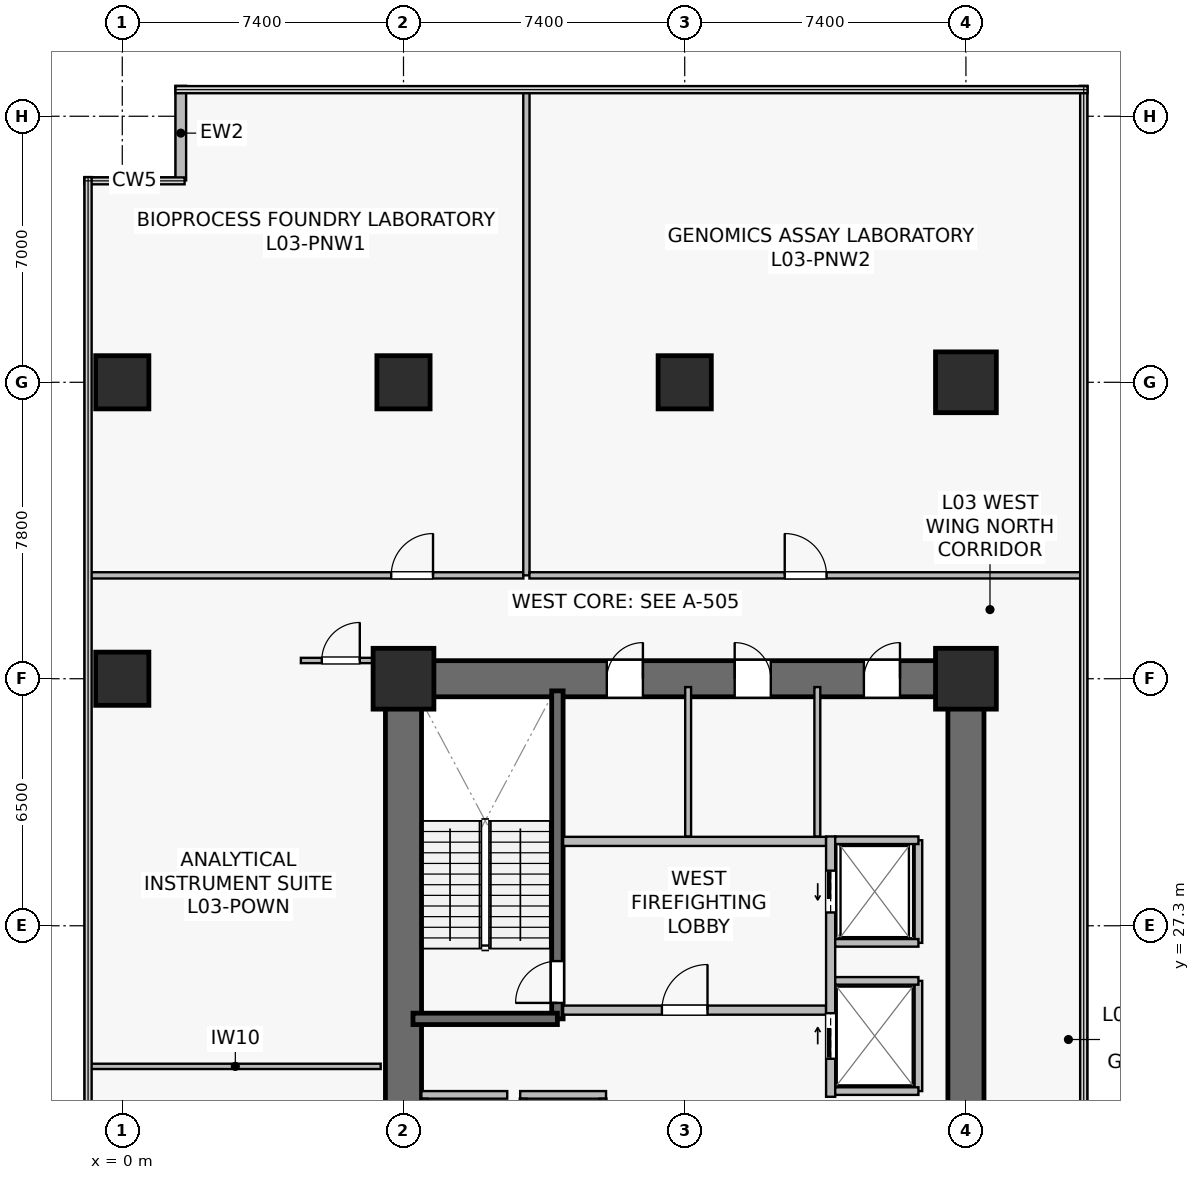
"""IFC4 building model, lengths in metres.
Left out: names, types, materials, properties, quantities, classifications, styles, units other than length and angle.
Written with IfcOpenShell. Run it as: python <this file> out.ifc"""

import sys

from ifc_helpers import new_model, si_unit, direction, frame, frame_2d, origin, origin_2d, place, context, subcontext, project, spatial, rectangle, extrude, source, transform, mapped, element, fill, save


model = new_model("IFC4")
c1 = context("Model", 3, precision=1e-05, world=origin(), true_north=direction((0.0, 1.0)))
c2 = subcontext(c1, "Body", "Model", "MODEL_VIEW")
j1 = project(units=[si_unit("LENGTHUNIT", "METRE"), si_unit("PLANEANGLEUNIT", "RADIAN")], contexts=[c1])
p1 = place(None, origin())
s1 = spatial("IfcSite", under=j1, at=p1, CompositionType="ELEMENT")
p2 = place(p1, origin())
s2 = spatial("IfcBuilding", under=s1, at=p2, CompositionType="ELEMENT")
p3 = place(p2, frame((0.0, 0.0, 10.2)))
s3 = spatial("IfcBuildingStorey", under=s2, at=p3, CompositionType="ELEMENT", Elevation=10.2)
p4 = place(p3, frame((6.925, 33.8, 0.0), z_axis=(0.0, 0.0, 1.0), x_axis=(1.0, 0.0, 0.0)))
e1 = element("IfcWall", 1, at=p4, inside=s3, PredefinedType="SHEAR", context=c2, shape_type="SweptSolid", body=[
    extrude(rectangle(XDim=15.75, YDim=0.95, at=frame_2d((7.875, 0.0))), origin(), (0.0, 0.0, 1.0), 4.45),
])
p5 = place(p4, frame((5.825, 0.0, 0.0)))
e2 = element("IfcOpeningElement", 2, at=p5, cuts=e1, PredefinedType="OPENING", context=c2, shape_type="SweptSolid", body=[
    extrude(rectangle(XDim=0.95, YDim=2.15, at=frame_2d((0.475, 1.075))), frame((0.0, 0.485, 0.0), z_axis=(0.0, -1.0, 0.0), x_axis=(1.0, 0.0, 0.0)), (0.0, 0.0, 1.0), 0.97),
])
p6 = place(p4, frame((9.19, 0.0, 0.0)))
e3 = element("IfcOpeningElement", 3, at=p6, cuts=e1, PredefinedType="OPENING", context=c2, shape_type="SweptSolid", body=[
    extrude(rectangle(XDim=0.95, YDim=2.15, at=frame_2d((0.475, 1.075))), frame((0.0, 0.485, 0.0), z_axis=(0.0, -1.0, 0.0), x_axis=(1.0, 0.0, 0.0)), (0.0, 0.0, 1.0), 0.97),
])
p7 = place(p4, frame((12.59, 0.0, 0.0)))
e4 = element("IfcOpeningElement", 4, at=p7, cuts=e1, PredefinedType="OPENING", context=c2, shape_type="SweptSolid", body=[
    extrude(rectangle(XDim=0.95, YDim=2.15, at=frame_2d((0.475, 1.075))), frame((0.0, 0.485, 0.0), z_axis=(0.0, -1.0, 0.0), x_axis=(1.0, 0.0, 0.0)), (0.0, 0.0, 1.0), 0.97),
])
p8 = place(p3, frame((7.4, 15.275, 0.0), z_axis=(0.0, 0.0, 1.0), x_axis=(0.0, 1.0, 0.0)))
e5 = element("IfcWall", 5, at=p8, inside=s3, PredefinedType="SHEAR", context=c2, shape_type="SweptSolid", body=[
    extrude(rectangle(XDim=18.05, YDim=0.95, at=frame_2d((9.025, 0.0))), origin(), (0.0, 0.0, 1.0), 4.45),
])
p9 = place(p3, frame((22.2, 15.275, 0.0), z_axis=(0.0, 0.0, 1.0), x_axis=(0.0, 1.0, 0.0)))
e6 = element("IfcWall", 6, at=p9, inside=s3, PredefinedType="SHEAR", context=c2, shape_type="SweptSolid", body=[
    extrude(rectangle(XDim=18.05, YDim=0.95, at=frame_2d((9.025, 0.0))), origin(), (0.0, 0.0, 1.0), 4.45),
])
p10 = place(p9, frame((3.275, 0.0, 0.0)))
e7 = element("IfcOpeningElement", 7, at=p10, cuts=e6, PredefinedType="OPENING", context=c2, shape_type="SweptSolid", body=[
    extrude(rectangle(XDim=1.42, YDim=2.2, at=frame_2d((0.71, 1.1))), frame((0.0, 0.485, 0.0), z_axis=(0.0, -1.0, 0.0), x_axis=(1.0, 0.0, 0.0)), (0.0, 0.0, 1.0), 0.97),
])
p11 = place(p3, frame((11.45, 24.85, 0.0), z_axis=(0.0, 0.0, 1.0), x_axis=(0.0, 1.0, 0.0)))
e8 = element("IfcWall", 8, at=p11, inside=s3, PredefinedType="SHEAR", context=c2, shape_type="SweptSolid", body=[
    extrude(rectangle(XDim=8.63, YDim=0.3, at=frame_2d((4.315, 0.0))), origin(), (0.0, 0.0, 1.0), 4.45),
])
p12 = place(p11, frame((0.42, 0.0, 0.0)))
e9 = element("IfcOpeningElement", 9, at=p12, cuts=e8, PredefinedType="OPENING", context=c2, shape_type="SweptSolid", body=[
    extrude(rectangle(XDim=1.1, YDim=2.15, at=frame_2d((0.55, 1.075))), frame((0.0, 0.16, 0.0), z_axis=(0.0, -1.0, 0.0), x_axis=(1.0, 0.0, 0.0)), (0.0, 0.0, 1.0), 0.32),
])
p13 = place(p3, frame((7.65, 24.85, 0.0), z_axis=(0.0, 0.0, 1.0), x_axis=(1.0, 0.0, 0.0)))
e10 = element("IfcWall", 10, at=p13, inside=s3, PredefinedType="SHEAR", context=c2, shape_type="SweptSolid", body=[
    extrude(rectangle(XDim=3.8, YDim=0.3, at=frame_2d((1.9, 0.0))), origin(), (0.0, 0.0, 1.0), 4.45),
])
m1 = source(origin(), c2, "Body", "SweptSolid", [
    extrude(rectangle(XDim=1.6, YDim=1.6, at=origin_2d()), origin(), (0.0, 0.0, 1.0), 4.8),
])
for number, where, z_axis, x_axis in (
    (11, (7.4, 33.8, 0.0), (0.0, 0.0, 1.0), (1.0, 0.0, 0.0)),
    (12, (22.2, 33.8, 0.0), (0.0, 0.0, 1.0), (1.0, 0.0, 0.0)),
):
    element("IfcColumn", number, at=place(p3, frame(where, z_axis=z_axis, x_axis=x_axis)), inside=s3, PredefinedType="COLUMN", context=c2, shape_type="MappedRepresentation", body=[
        mapped(m1, transform((0.0, 0.0, 0.0), scale=1.0)),
    ])
m2 = source(origin(), c2, "Body", "SweptSolid", [
    extrude(rectangle(XDim=1.4, YDim=1.4, at=origin_2d()), origin(), (0.0, 0.0, 1.0), 4.8),
])
p14 = place(p3, frame((14.8, 41.6, 0.0), z_axis=(0.0, 0.0, 1.0), x_axis=(1.0, 0.0, 0.0)))
e13 = element("IfcColumn", 13, at=p14, inside=s3, PredefinedType="COLUMN", context=c2, shape_type="MappedRepresentation", body=[
    mapped(m2, transform((0.0, 0.0, 0.0), scale=1.0)),
])
p15 = place(p3, frame((22.2, 41.6, 0.0), z_axis=(0.0, 0.0, 1.0), x_axis=(1.0, 0.0, 0.0)))
e14 = element("IfcColumn", 14, at=p15, inside=s3, PredefinedType="COLUMN", context=c2, shape_type="MappedRepresentation", body=[
    mapped(m1, transform((0.0, 0.0, 0.0), scale=1.0)),
])
for number, where, z_axis, x_axis in (
    (15, (7.4, 41.6, 0.0), (0.0, 0.0, 1.0), (1.0, 0.0, 0.0)),
    (16, (0.0, 33.8, 0.0), (0.0, 0.0, 1.0), (1.0, 0.0, 0.0)),
    (17, (0.0, 41.6, 0.0), (0.0, 0.0, 1.0), (1.0, 0.0, 0.0)),
):
    element("IfcColumn", number, at=place(p3, frame(where, z_axis=z_axis, x_axis=x_axis)), inside=s3, PredefinedType="COLUMN", context=c2, shape_type="MappedRepresentation", body=[
        mapped(m2, transform((0.0, 0.0, 0.0), scale=1.0)),
    ])
p16 = place(p3, frame((1.54, 49.4, 0.0), z_axis=(0.0, 0.0, 1.0), x_axis=(0.0, -1.0, 0.0)))
e18 = element("IfcWall", 18, at=p16, inside=s3, PredefinedType="STANDARD", context=c2, shape_type="SweptSolid", body=[
    extrude(rectangle(XDim=2.488, YDim=0.28, at=frame_2d((1.244, 0.0))), origin(), (0.0, 0.0, 1.0), 4.45),
])
p17 = place(p3, frame((11.6, 25.08, 0.0), z_axis=(0.0, 0.0, 1.0), x_axis=(1.0, 0.0, 0.0)))
e19 = element("IfcWall", 19, at=p17, inside=s3, PredefinedType="SOLIDWALL", context=c2, shape_type="SweptSolid", body=[
    extrude(rectangle(XDim=6.92, YDim=0.24, at=frame_2d((3.46, 0.0))), origin(), (0.0, 0.0, 1.0), 3.735),
])
p18 = place(p17, frame((2.6, 0.0, 0.0)))
e20 = element("IfcOpeningElement", 20, at=p18, cuts=e19, PredefinedType="OPENING", context=c2, shape_type="SweptSolid", body=[
    extrude(rectangle(XDim=1.2, YDim=2.16, at=frame_2d((0.6, 1.08))), frame((0.0, 0.13, 0.0), z_axis=(0.0, -1.0, 0.0), x_axis=(1.0, 0.0, 0.0)), (0.0, 0.0, 1.0), 0.26),
])
p19 = place(p3, frame((11.6, 29.52, 0.0), z_axis=(0.0, 0.0, 1.0), x_axis=(1.0, 0.0, 0.0)))
e21 = element("IfcWall", 21, at=p19, inside=s3, PredefinedType="SOLIDWALL", context=c2, shape_type="SweptSolid", body=[
    extrude(rectangle(XDim=6.92, YDim=0.24, at=frame_2d((3.46, 0.0))), origin(), (0.0, 0.0, 1.0), 3.735),
])
p20 = place(p3, frame((18.64, 22.8, 0.0), z_axis=(0.0, 0.0, 1.0), x_axis=(0.0, 1.0, 0.0)))
e22 = element("IfcWall", 22, at=p20, inside=s3, PredefinedType="SOLIDWALL", context=c2, shape_type="SweptSolid", body=[
    extrude(rectangle(XDim=6.85, YDim=0.24, at=frame_2d((3.425, 0.0))), origin(), (0.0, 0.0, 1.0), 3.535),
])
p21 = place(p20, frame((4.85, 0.0, 0.0)))
e23 = element("IfcOpeningElement", 23, at=p21, cuts=e22, PredefinedType="OPENING", context=c2, shape_type="SweptSolid", body=[
    extrude(rectangle(XDim=1.1, YDim=2.22, at=frame_2d((0.55, 1.11))), frame((0.0, 0.13, 0.0), z_axis=(0.0, -1.0, 0.0), x_axis=(1.0, 0.0, 0.0)), (0.0, 0.0, 1.0), 0.26),
])
p22 = place(p20, frame((1.0, 0.0, 0.0)))
e24 = element("IfcOpeningElement", 24, at=p22, cuts=e22, PredefinedType="OPENING", context=c2, shape_type="SweptSolid", body=[
    extrude(rectangle(XDim=1.2, YDim=2.22, at=frame_2d((0.6, 1.11))), frame((0.0, 0.13, 0.0), z_axis=(0.0, -1.0, 0.0), x_axis=(1.0, 0.0, 0.0)), (0.0, 0.0, 1.0), 0.26),
])
p23 = place(p3, frame((7.87, 22.85, 0.0), z_axis=(0.0, 0.0, 1.0), x_axis=(1.0, 0.0, 0.0)))
e25 = element("IfcWall", 25, at=p23, inside=s3, PredefinedType="SOLIDWALL", context=c2, shape_type="SweptSolid", body=[
    extrude(rectangle(XDim=2.26, YDim=0.2, at=frame_2d((1.13, 0.0))), origin(), (0.0, 0.0, 1.0), 4.45),
])
p24 = place(p3, frame((7.95, 20.85, 0.0), z_axis=(0.0, 0.0, 1.0), x_axis=(0.0, 1.0, 0.0)))
e26 = element("IfcWall", 26, at=p24, inside=s3, PredefinedType="SOLIDWALL", context=c2, shape_type="SweptSolid", body=[
    extrude(rectangle(XDim=1.9, YDim=0.18, at=frame_2d((0.95, 0.0))), origin(), (0.0, 0.0, 1.0), 4.45),
])
p25 = place(p3, frame((10.47, 22.85, 0.0), z_axis=(0.0, 0.0, 1.0), x_axis=(1.0, 0.0, 0.0)))
e27 = element("IfcWall", 27, at=p25, inside=s3, PredefinedType="SOLIDWALL", context=c2, shape_type="SweptSolid", body=[
    extrude(rectangle(XDim=2.26, YDim=0.2, at=frame_2d((1.13, 0.0))), origin(), (0.0, 0.0, 1.0), 4.45),
])
for number, where, z_axis, x_axis in (
    (28, (10.55, 20.85, 0.0), (0.0, 0.0, 1.0), (0.0, 1.0, 0.0)),
    (29, (12.65, 20.85, 0.0), (0.0, 0.0, 1.0), (0.0, 1.0, 0.0)),
):
    element("IfcWall", number, at=place(p3, frame(where, z_axis=z_axis, x_axis=x_axis)), inside=s3, PredefinedType="SOLIDWALL", context=c2, shape_type="SweptSolid", body=[
        extrude(rectangle(XDim=1.9, YDim=0.18, at=frame_2d((0.95, 0.0))), origin(), (0.0, 0.0, 1.0), 4.45),
    ])
p26 = place(p3, frame((20.95, 26.85, 0.0), z_axis=(0.0, 0.0, 1.0), x_axis=(0.0, 1.0, 0.0)))
e30 = element("IfcWall", 30, at=p26, inside=s3, PredefinedType="SOLIDWALL", context=c2, shape_type="SweptSolid", body=[
    extrude(rectangle(XDim=2.7, YDim=0.2, at=frame_2d((1.35, 0.0))), origin(), (0.0, 0.0, 1.0), 4.45),
])
p27 = place(p3, frame((18.76, 29.55, 0.0), z_axis=(0.0, 0.0, 1.0), x_axis=(1.0, 0.0, 0.0)))
e31 = element("IfcWall", 31, at=p27, inside=s3, PredefinedType="SOLIDWALL", context=c2, shape_type="SweptSolid", body=[
    extrude(rectangle(XDim=2.19, YDim=0.2, at=frame_2d((1.095, 0.0))), origin(), (0.0, 0.0, 1.0), 4.45),
])
p28 = place(p3, frame((18.76, 26.85, 0.0), z_axis=(0.0, 0.0, 1.0), x_axis=(1.0, 0.0, 0.0)))
e32 = element("IfcWall", 32, at=p28, inside=s3, PredefinedType="SOLIDWALL", context=c2, shape_type="SweptSolid", body=[
    extrude(rectangle(XDim=2.19, YDim=0.2, at=frame_2d((1.095, 0.0))), origin(), (0.0, 0.0, 1.0), 3.847),
])
p29 = place(p3, frame((20.95, 22.95, 0.0), z_axis=(0.0, 0.0, 1.0), x_axis=(0.0, 1.0, 0.0)))
e33 = element("IfcWall", 33, at=p29, inside=s3, PredefinedType="SOLIDWALL", context=c2, shape_type="SweptSolid", body=[
    extrude(rectangle(XDim=2.9, YDim=0.2, at=frame_2d((1.45, 0.0))), origin(), (0.0, 0.0, 1.0), 3.535),
])
for number, where, z_axis, x_axis in (
    (34, (18.76, 25.85, 0.0), (0.0, 0.0, 1.0), (1.0, 0.0, 0.0)),
    (35, (18.76, 22.95, 0.0), (0.0, 0.0, 1.0), (1.0, 0.0, 0.0)),
):
    element("IfcWall", number, at=place(p3, frame(where, z_axis=z_axis, x_axis=x_axis)), inside=s3, PredefinedType="SOLIDWALL", context=c2, shape_type="SweptSolid", body=[
        extrude(rectangle(XDim=2.19, YDim=0.2, at=frame_2d((1.095, 0.0))), origin(), (0.0, 0.0, 1.0), 4.45),
    ])
p30 = place(p3, frame((14.89, 29.65, 0.0), z_axis=(0.0, 0.0, 1.0), x_axis=(0.0, 1.0, 0.0)))
e36 = element("IfcWall", 36, at=p30, inside=s3, PredefinedType="PLUMBINGWALL", context=c2, shape_type="SweptSolid", body=[
    extrude(rectangle(XDim=3.93, YDim=0.155, at=frame_2d((1.965, 0.0))), origin(), (0.0, 0.0, 1.0), 3.735),
])
p31 = place(p3, frame((18.29, 29.65, 0.0), z_axis=(0.0, 0.0, 1.0), x_axis=(0.0, 1.0, 0.0)))
e37 = element("IfcWall", 37, at=p31, inside=s3, PredefinedType="PLUMBINGWALL", context=c2, shape_type="SweptSolid", body=[
    extrude(rectangle(XDim=3.93, YDim=0.155, at=frame_2d((1.965, 0.0))), origin(), (0.0, 0.0, 1.0), 4.45),
])
p32 = place(p3, frame((-0.85, 23.6, 0.0), z_axis=(0.0, 0.0, 1.0), x_axis=(1.0, 0.0, 0.0)))
e38 = element("IfcWall", 38, at=p32, inside=s3, PredefinedType="PARTITIONING", context=c2, shape_type="SweptSolid", body=[
    extrude(rectangle(XDim=7.65, YDim=0.14, at=frame_2d((3.825, 0.0))), origin(), (0.0, 0.0, 1.0), 3.835),
])
p33 = place(p3, frame((4.7, 34.28, 0.0), z_axis=(0.0, 0.0, 1.0), x_axis=(1.0, 0.0, 0.0)))
e39 = element("IfcWall", 39, at=p33, inside=s3, PredefinedType="PARTITIONING", context=c2, shape_type="SweptSolid", body=[
    extrude(rectangle(XDim=2.1, YDim=0.14, at=frame_2d((1.05, 0.0))), origin(), (0.0, 0.0, 1.0), 4.45),
])
p34 = place(p33, frame((0.55, 0.0, 0.0)))
e40 = element("IfcOpeningElement", 40, at=p34, cuts=e39, PredefinedType="OPENING", context=c2, shape_type="SweptSolid", body=[
    extrude(rectangle(XDim=1.0, YDim=2.15, at=frame_2d((0.5, 1.075))), frame((0.0, 0.08, 0.0), z_axis=(0.0, -1.0, 0.0), x_axis=(1.0, 0.0, 0.0)), (0.0, 0.0, 1.0), 0.16),
])
p35 = place(p3, frame((-0.85, 36.52, 0.0), z_axis=(0.0, 0.0, 1.0), x_axis=(1.0, 0.0, 0.0)))
e41 = element("IfcWall", 41, at=p35, inside=s3, PredefinedType="PARTITIONING", context=c2, shape_type="SweptSolid", body=[
    extrude(rectangle(XDim=11.404, YDim=0.165, at=frame_2d((5.702, 0.0))), origin(), (0.0, 0.0, 1.0), 3.735),
])
p36 = place(p35, frame((7.927, 0.0, 0.0)))
e42 = element("IfcOpeningElement", 42, at=p36, cuts=e41, PredefinedType="OPENING", context=c2, shape_type="SweptSolid", body=[
    extrude(rectangle(XDim=1.1, YDim=2.18, at=frame_2d((0.55, 1.09))), frame((0.0, 0.093, 0.0), z_axis=(0.0, -1.0, 0.0), x_axis=(1.0, 0.0, 0.0)), (0.0, 0.0, 1.0), 0.185),
])
p37 = place(p3, frame((10.634, 36.52, 0.0), z_axis=(0.0, 0.0, 1.0), x_axis=(0.0, 1.0, 0.0)))
e43 = element("IfcWall", 43, at=p37, inside=s3, PredefinedType="PARTITIONING", context=c2, shape_type="SweptSolid", body=[
    extrude(rectangle(XDim=12.77, YDim=0.165, at=frame_2d((6.385, 0.0))), origin(), (0.0, 0.0, 1.0), 3.635),
])
p38 = place(p3, frame((10.714, 36.52, 0.0), z_axis=(0.0, 0.0, 1.0), x_axis=(1.0, 0.0, 0.0)))
e44 = element("IfcWall", 44, at=p38, inside=s3, PredefinedType="PARTITIONING", context=c2, shape_type="SweptSolid", body=[
    extrude(rectangle(XDim=14.536, YDim=0.165, at=frame_2d((7.268, 0.0))), origin(), (0.0, 0.0, 1.0), 3.735),
])
p39 = place(p38, frame((6.718, 0.0, 0.0)))
e45 = element("IfcOpeningElement", 45, at=p39, cuts=e44, PredefinedType="OPENING", context=c2, shape_type="SweptSolid", body=[
    extrude(rectangle(XDim=1.1, YDim=2.18, at=frame_2d((0.55, 1.09))), frame((0.0, 0.093, 0.0), z_axis=(0.0, -1.0, 0.0), x_axis=(1.0, 0.0, 0.0)), (0.0, 0.0, 1.0), 0.185),
])
m3 = source(origin(), c2, "Body", "SweptSolid", [
    extrude(rectangle(XDim=1.1, YDim=2.15, at=frame_2d((0.55, 1.075))), frame((0.0, 0.025, 0.0), z_axis=(0.0, -1.0, 0.0), x_axis=(1.0, 0.0, 0.0)), (0.0, 0.0, 1.0), 0.05),
])
p40 = place(p12, origin())
e46 = element("IfcDoor", 46, at=p40, inside=s3, OperationType="SINGLE_SWING_LEFT", PredefinedType="DOOR", context=c2, shape_type="MappedRepresentation", body=[
    mapped(m3, transform((0.0, 0.0, 0.0), scale=1.0)),
])
fill(e9, e46)
m4 = source(origin(), c2, "Body", "SweptSolid", [
    extrude(rectangle(XDim=1.2, YDim=2.16, at=frame_2d((0.6, 1.08))), frame((0.0, 0.025, 0.0), z_axis=(0.0, -1.0, 0.0), x_axis=(1.0, 0.0, 0.0)), (0.0, 0.0, 1.0), 0.05),
])
p41 = place(p18, origin())
e47 = element("IfcDoor", 47, at=p41, inside=s3, OperationType="SINGLE_SWING_RIGHT", PredefinedType="DOOR", context=c2, shape_type="MappedRepresentation", body=[
    mapped(m4, transform((0.0, 0.0, 0.0), scale=1.0)),
])
fill(e20, e47)
m5 = source(origin(), c2, "Body", "SweptSolid", [
    extrude(rectangle(XDim=1.1, YDim=2.22, at=frame_2d((0.55, 1.11))), frame((0.0, 0.025, 0.0), z_axis=(0.0, -1.0, 0.0), x_axis=(1.0, 0.0, 0.0)), (0.0, 0.0, 1.0), 0.05),
])
p42 = place(p21, origin())
e48 = element("IfcDoor", 48, at=p42, inside=s3, OperationType="SLIDING_TO_LEFT", PredefinedType="USERDEFINED", context=c2, shape_type="MappedRepresentation", body=[
    mapped(m5, transform((0.0, 0.0, 0.0), scale=1.0)),
])
fill(e23, e48)
m6 = source(origin(), c2, "Body", "SweptSolid", [
    extrude(rectangle(XDim=1.2, YDim=2.22, at=frame_2d((0.6, 1.11))), frame((0.0, 0.025, 0.0), z_axis=(0.0, -1.0, 0.0), x_axis=(1.0, 0.0, 0.0)), (0.0, 0.0, 1.0), 0.05),
])
p43 = place(p22, origin())
e49 = element("IfcDoor", 49, at=p43, inside=s3, OperationType="SLIDING_TO_RIGHT", PredefinedType="USERDEFINED", context=c2, shape_type="MappedRepresentation", body=[
    mapped(m6, transform((0.0, 0.0, 0.0), scale=1.0)),
])
fill(e24, e49)
m7 = source(origin(), c2, "Body", "SweptSolid", [
    extrude(rectangle(XDim=0.95, YDim=2.15, at=frame_2d((0.475, 1.075))), frame((0.0, 0.025, 0.0), z_axis=(0.0, -1.0, 0.0), x_axis=(1.0, 0.0, 0.0)), (0.0, 0.0, 1.0), 0.05),
])
p44 = place(p5, origin())
e50 = element("IfcDoor", 50, at=p44, inside=s3, OperationType="SINGLE_SWING_RIGHT", PredefinedType="DOOR", context=c2, shape_type="MappedRepresentation", body=[
    mapped(m7, transform((0.0, 0.0, 0.0), scale=1.0)),
])
fill(e2, e50)
p45 = place(p6, origin())
e51 = element("IfcDoor", 51, at=p45, inside=s3, OperationType="SINGLE_SWING_LEFT", PredefinedType="DOOR", context=c2, shape_type="MappedRepresentation", body=[
    mapped(m7, transform((0.0, 0.0, 0.0), scale=1.0)),
])
fill(e3, e51)
p46 = place(p7, origin())
e52 = element("IfcDoor", 52, at=p46, inside=s3, OperationType="SINGLE_SWING_RIGHT", PredefinedType="DOOR", context=c2, shape_type="MappedRepresentation", body=[
    mapped(m7, transform((0.0, 0.0, 0.0), scale=1.0)),
])
fill(e4, e52)
m8 = source(origin(), c2, "Body", "SweptSolid", [
    extrude(rectangle(XDim=1.0, YDim=2.15, at=frame_2d((0.5, 1.075))), frame((0.0, 0.025, 0.0), z_axis=(0.0, -1.0, 0.0), x_axis=(1.0, 0.0, 0.0)), (0.0, 0.0, 1.0), 0.05),
])
p47 = place(p34, origin())
e53 = element("IfcDoor", 53, at=p47, inside=s3, OperationType="SINGLE_SWING_RIGHT", PredefinedType="DOOR", context=c2, shape_type="MappedRepresentation", body=[
    mapped(m8, transform((0.0, 0.0, 0.0), scale=1.0)),
])
fill(e40, e53)
m9 = source(origin(), c2, "Body", "SweptSolid", [
    extrude(rectangle(XDim=1.1, YDim=2.18, at=frame_2d((0.55, 1.09))), frame((0.0, 0.025, 0.0), z_axis=(0.0, -1.0, 0.0), x_axis=(1.0, 0.0, 0.0)), (0.0, 0.0, 1.0), 0.05),
])
p48 = place(p36, origin())
e54 = element("IfcDoor", 54, at=p48, inside=s3, OperationType="SINGLE_SWING_RIGHT", PredefinedType="DOOR", context=c2, shape_type="MappedRepresentation", body=[
    mapped(m9, transform((0.0, 0.0, 0.0), scale=1.0)),
])
fill(e42, e54)
p49 = place(p39, origin())
e55 = element("IfcDoor", 55, at=p49, inside=s3, OperationType="SINGLE_SWING_LEFT", PredefinedType="DOOR", context=c2, shape_type="MappedRepresentation", body=[
    mapped(m9, transform((0.0, 0.0, 0.0), scale=1.0)),
])
fill(e45, e55)
save(model, sys.argv[1])
